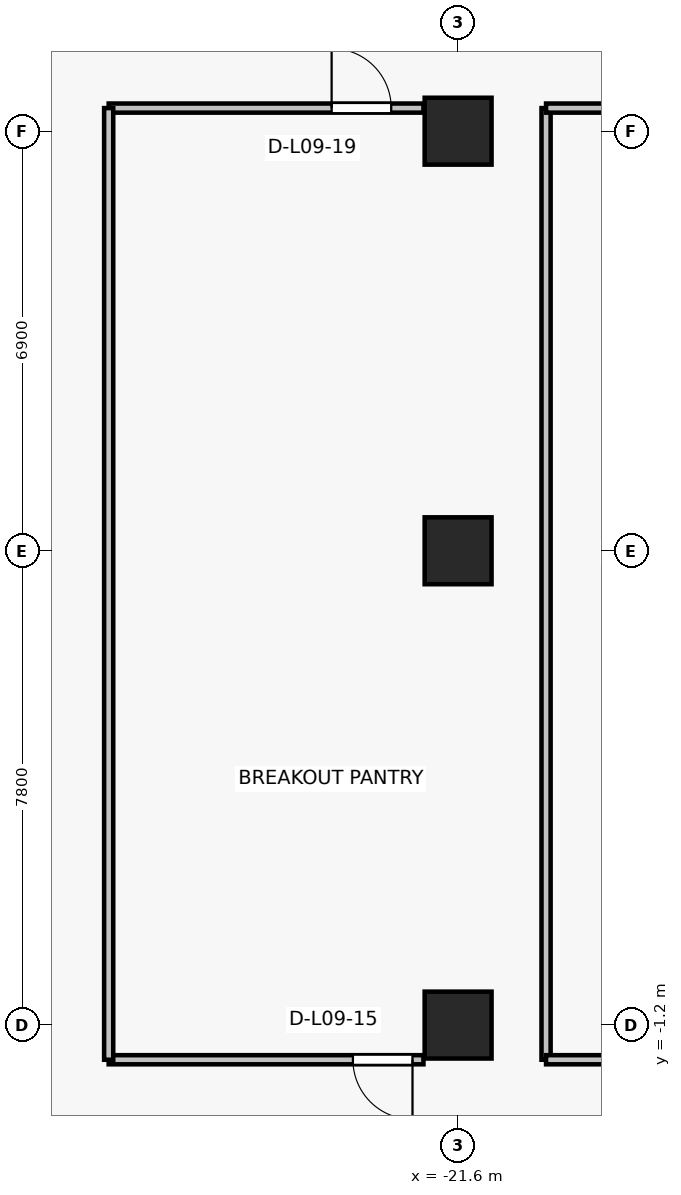
"""IFC4 building model, lengths in metres.
Left out: names, types, materials, properties, quantities, classifications, styles, units other than length and angle.
Written with IfcOpenShell. Run it as: python <this file> out.ifc"""

import sys

from ifc_helpers import new_model, si_unit, direction, frame, frame_2d, origin, origin_2d, place, context, subcontext, project, spatial, rectangle, extrude, source, transform, mapped, element, fill, save


model = new_model("IFC4")
c1 = context("Model", 3, precision=1e-05, world=origin(), true_north=direction((0.0, 1.0)))
c2 = subcontext(c1, "Body", "Model", "MODEL_VIEW")
j1 = project(units=[si_unit("LENGTHUNIT", "METRE"), si_unit("PLANEANGLEUNIT", "RADIAN")], contexts=[c1])
p1 = place(None, origin())
s1 = spatial("IfcSite", under=j1, at=p1, CompositionType="ELEMENT")
p2 = place(p1, origin())
s2 = spatial("IfcBuilding", under=s1, at=p2, CompositionType="ELEMENT")
p3 = place(p2, frame((0.0, 0.0, 37.3)))
s3 = spatial("IfcBuildingStorey", under=s2, at=p3, CompositionType="ELEMENT", Elevation=37.3)
for number, where, z_axis, x_axis in (
    (1, (-21.6, -1.2, 0.0), (0.0, 0.0, 1.0), (1.0, 0.0, 0.0)),
    (2, (-21.6, 6.6, 0.0), (0.0, 0.0, 1.0), (1.0, 0.0, 0.0)),
    (3, (-21.6, 13.5, 0.0), (0.0, 0.0, 1.0), (1.0, 0.0, 0.0)),
):
    element("IfcColumn", number, at=place(p3, frame(where, z_axis=z_axis, x_axis=x_axis)), inside=s3, PredefinedType="COLUMN", context=c2, shape_type="SweptSolid", body=[
        extrude(rectangle(XDim=1.1, YDim=1.1, at=origin_2d()), origin(), (0.0, 0.0, 1.0), 3.3),
    ])
p4 = place(p3, frame((-22.17, -1.77, 0.0), z_axis=(0.0, 0.0, 1.0), x_axis=(-1.0, 0.0, 0.0)))
e4 = element("IfcWall", 4, at=p4, inside=s3, PredefinedType="PARTITIONING", context=c2, shape_type="SweptSolid", body=[
    extrude(rectangle(XDim=5.177, YDim=0.15, at=frame_2d((2.588, 0.0))), origin(), (0.0, 0.0, 1.0), 3.075),
])
p5 = place(p4, frame((0.18, 0.0, 0.0)))
e5 = element("IfcOpeningElement", 5, at=p5, cuts=e4, PredefinedType="OPENING", context=c2, shape_type="SweptSolid", body=[
    extrude(rectangle(XDim=0.98, YDim=2.15, at=frame_2d((0.49, 1.075))), frame((0.0, 0.085, 0.0), z_axis=(0.0, -1.0, 0.0), x_axis=(1.0, 0.0, 0.0)), (0.0, 0.0, 1.0), 0.17),
])
p6 = place(p3, frame((-27.346, 13.88, 0.0), z_axis=(0.0, 0.0, 1.0), x_axis=(1.0, 0.0, 0.0)))
e6 = element("IfcWall", 6, at=p6, inside=s3, PredefinedType="PARTITIONING", context=c2, shape_type="SweptSolid", body=[
    extrude(rectangle(XDim=5.177, YDim=0.15, at=frame_2d((2.588, 0.0))), origin(), (0.0, 0.0, 1.0), 3.075),
])
p7 = place(p6, frame((3.667, 0.0, 0.0)))
e7 = element("IfcOpeningElement", 7, at=p7, cuts=e6, PredefinedType="OPENING", context=c2, shape_type="SweptSolid", body=[
    extrude(rectangle(XDim=0.98, YDim=2.15, at=frame_2d((0.49, 1.075))), frame((0.0, 0.085, 0.0), z_axis=(0.0, -1.0, 0.0), x_axis=(1.0, 0.0, 0.0)), (0.0, 0.0, 1.0), 0.17),
])
for number, where, z_axis, x_axis in (
    (8, (-27.346, -1.77, 0.0), (0.0, 0.0, 1.0), (0.0, 1.0, 0.0)),
    (9, (-20.154, 13.88, 0.0), (0.0, 0.0, 1.0), (0.0, -1.0, 0.0)),
):
    element("IfcWall", number, at=place(p3, frame(where, z_axis=z_axis, x_axis=x_axis)), inside=s3, PredefinedType="PARTITIONING", context=c2, shape_type="SweptSolid", body=[
        extrude(rectangle(XDim=15.65, YDim=0.15, at=frame_2d((7.825, 0.0))), origin(), (0.0, 0.0, 1.0), 2.465),
    ])
p8 = place(p3, frame((-15.02, -1.77, 0.0), z_axis=(0.0, 0.0, 1.0), x_axis=(-1.0, 0.0, 0.0)))
e10 = element("IfcWall", 10, at=p8, inside=s3, PredefinedType="PARTITIONING", context=c2, shape_type="SweptSolid", body=[
    extrude(rectangle(XDim=5.134, YDim=0.15, at=frame_2d((2.567, 0.0))), origin(), (0.0, 0.0, 1.0), 3.075),
])
p9 = place(p8, frame((2.052, 0.0, 0.0)))
e11 = element("IfcOpeningElement", 11, at=p9, cuts=e10, PredefinedType="OPENING", context=c2, shape_type="SweptSolid", body=[
    extrude(rectangle(XDim=0.98, YDim=2.15, at=frame_2d((0.49, 1.075))), frame((0.0, 0.085, 0.0), z_axis=(0.0, -1.0, 0.0), x_axis=(1.0, 0.0, 0.0)), (0.0, 0.0, 1.0), 0.17),
])
p10 = place(p3, frame((-20.154, 13.88, 0.0), z_axis=(0.0, 0.0, 1.0), x_axis=(1.0, 0.0, 0.0)))
e12 = element("IfcWall", 12, at=p10, inside=s3, PredefinedType="PARTITIONING", context=c2, shape_type="SweptSolid", body=[
    extrude(rectangle(XDim=5.134, YDim=0.15, at=frame_2d((2.567, 0.0))), origin(), (0.0, 0.0, 1.0), 3.075),
])
m1 = source(origin(), c2, "Body", "SweptSolid", [
    extrude(rectangle(XDim=0.98, YDim=2.15, at=frame_2d((0.49, 1.075))), frame((0.0, 0.025, 0.0), z_axis=(0.0, -1.0, 0.0), x_axis=(1.0, 0.0, 0.0)), (0.0, 0.0, 1.0), 0.05),
])
p11 = place(p5, origin())
e13 = element("IfcDoor", 13, at=p11, inside=s3, OperationType="SINGLE_SWING_LEFT", PredefinedType="DOOR", context=c2, shape_type="MappedRepresentation", body=[
    mapped(m1, transform((0.0, 0.0, 0.0), x_axis=(1.0, 0.0, 0.0), y_axis=(0.0, 1.0, 0.0), z_axis=(0.0, 0.0, 1.0), scale=1.0)),
])
fill(e5, e13)
p12 = place(p7, origin())
e14 = element("IfcDoor", 14, at=p12, inside=s3, OperationType="SINGLE_SWING_LEFT", PredefinedType="DOOR", context=c2, shape_type="MappedRepresentation", body=[
    mapped(m1, transform((0.0, 0.0, 0.0), x_axis=(1.0, 0.0, 0.0), y_axis=(0.0, 1.0, 0.0), z_axis=(0.0, 0.0, 1.0), scale=1.0)),
])
fill(e7, e14)
save(model, sys.argv[1])
